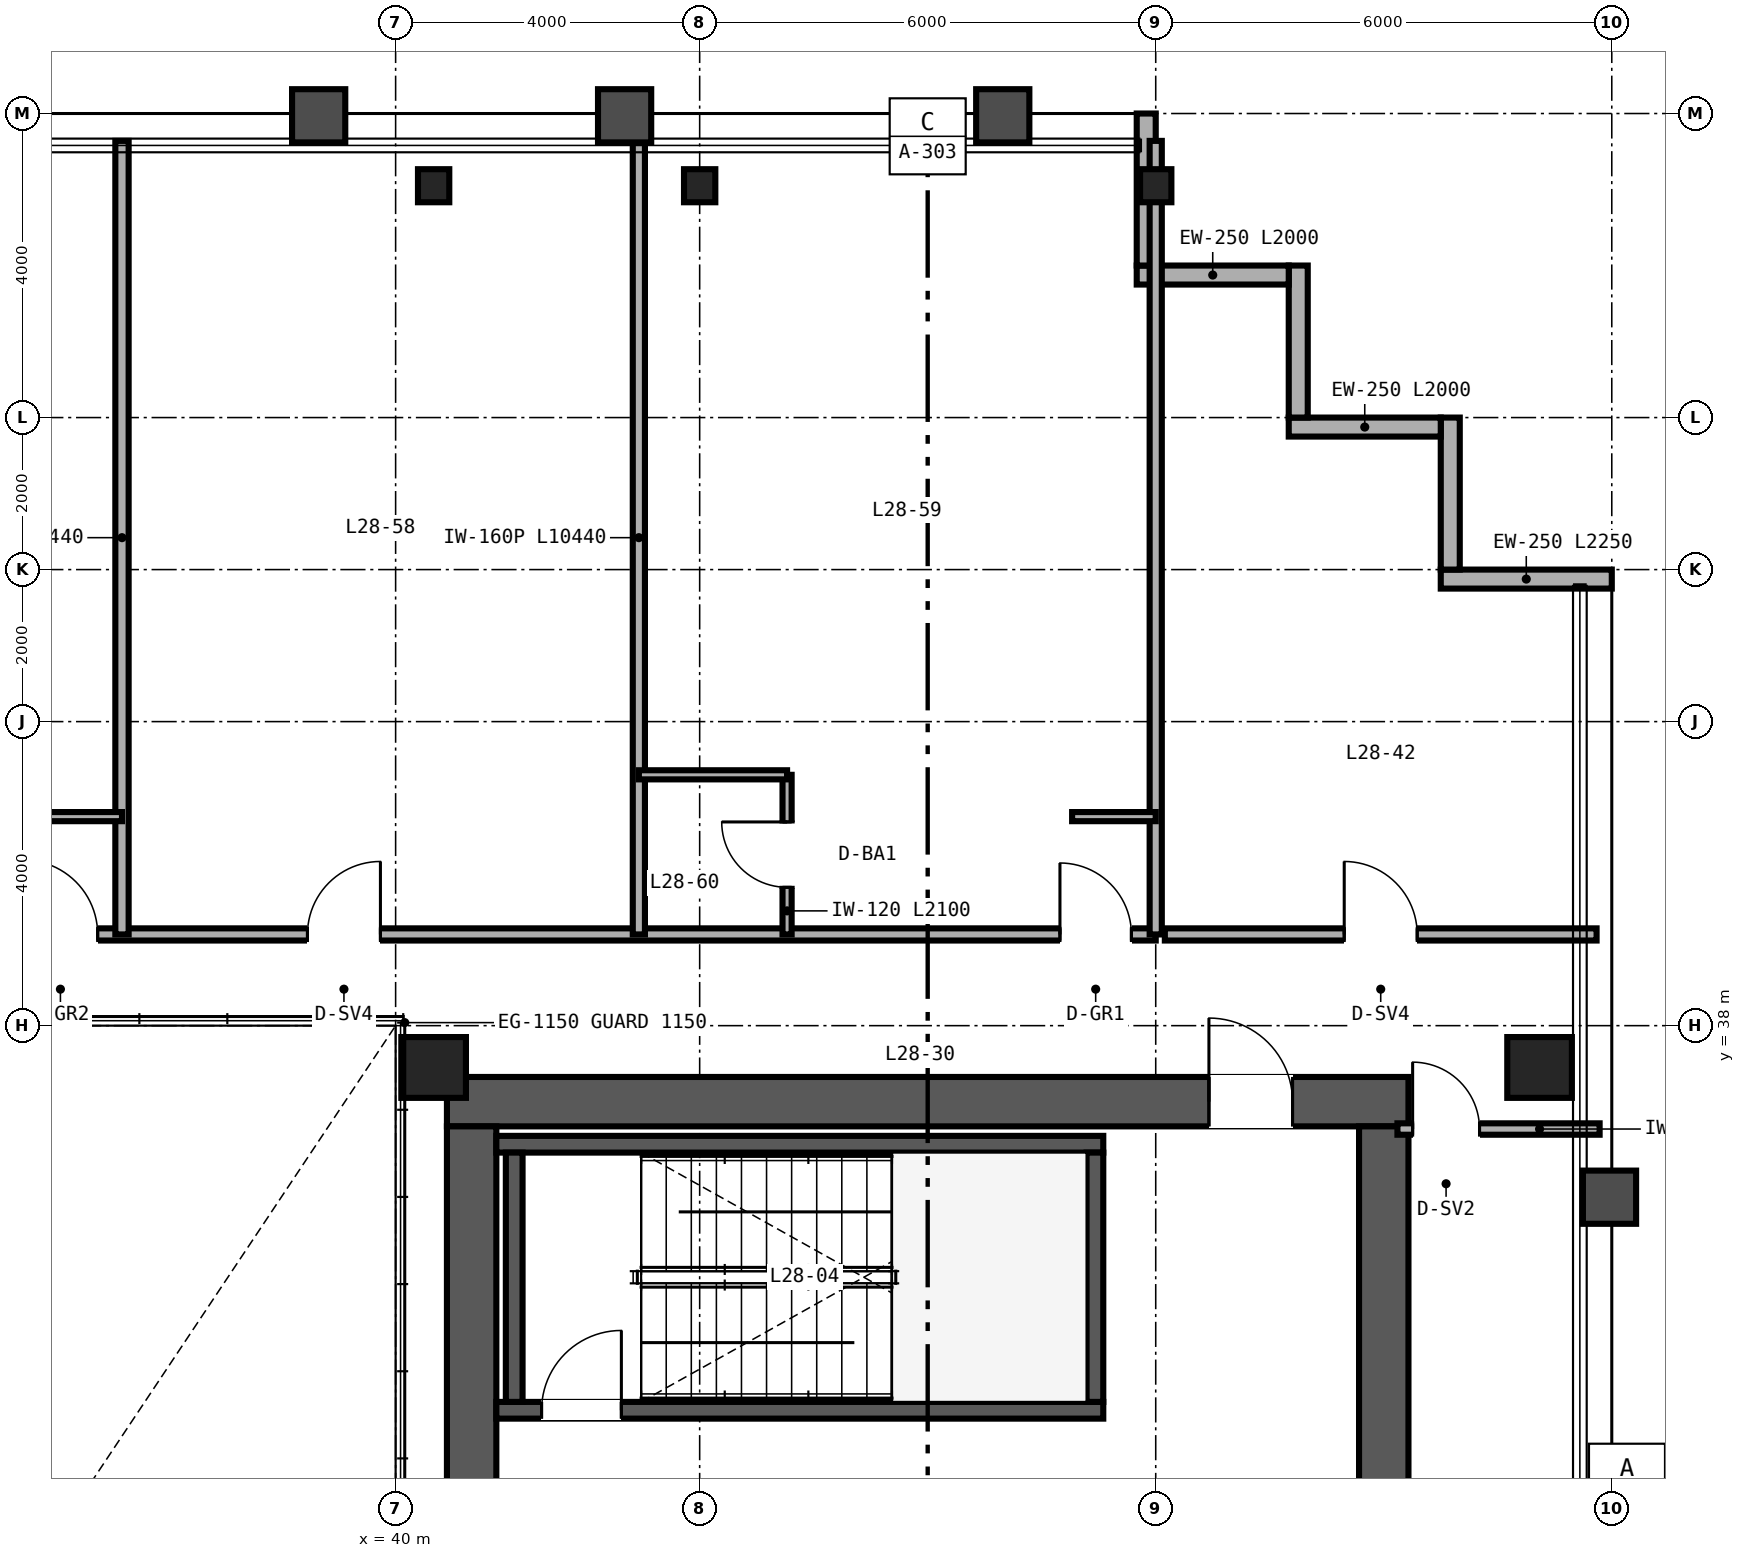
"""IFC4 building model, lengths in metres.
Left out: names, types, materials, properties, quantities, classifications, styles, units other than length and angle.
Written with IfcOpenShell. Run it as: python <this file> out.ifc"""

import sys

from ifc_helpers import new_model, si_unit, direction, frame, frame_2d, origin, origin_2d, place, context, subcontext, project, spatial, rectangle, hollow_rectangle, i_section, extrude, source, transform, mapped, element, fill, save


model = new_model("IFC4")
c1 = context("Model", 3, precision=1e-05, world=origin(), true_north=direction((0.0, 1.0)))
c2 = subcontext(c1, "Body", "Model", "MODEL_VIEW")
j1 = project(units=[si_unit("LENGTHUNIT", "METRE"), si_unit("PLANEANGLEUNIT", "RADIAN")], contexts=[c1])
p1 = place(None, origin())
s1 = spatial("IfcSite", under=j1, at=p1, CompositionType="ELEMENT")
p2 = place(p1, origin())
s2 = spatial("IfcBuilding", under=s1, at=p2, CompositionType="ELEMENT")
p3 = place(p2, frame((0.0, 0.0, 115.2)))
s3 = spatial("IfcBuildingStorey", under=s2, at=p3, CompositionType="ELEMENT", Elevation=115.2)
p4 = place(p3, frame((40.675, 37.0, 0.0), z_axis=(0.0, 0.0, 1.0), x_axis=(1.0, 0.0, 0.0)))
e1 = element("IfcWall", 1, at=p4, inside=s3, PredefinedType="SHEAR", context=c2, shape_type="SweptSolid", body=[
    extrude(rectangle(XDim=12.65, YDim=0.65, at=frame_2d((6.325, 0.0))), origin(), (0.0, 0.0, 1.0), 3.36),
])
p5 = place(p4, frame((10.025, 0.0, 0.0)))
e2 = element("IfcOpeningElement", 2, at=p5, cuts=e1, PredefinedType="OPENING", context=c2, shape_type="SweptSolid", body=[
    extrude(rectangle(XDim=1.1, YDim=2.15, at=frame_2d((0.55, 1.075))), frame((0.0, 0.335, 0.0), z_axis=(0.0, -1.0, 0.0), x_axis=(1.0, 0.0, 0.0)), (0.0, 0.0, 1.0), 0.67),
])
for number, where, z_axis, x_axis in (
    (3, (41.0, 15.325, 0.0), (0.0, 0.0, 1.0), (0.0, 1.0, 0.0)),
    (4, (53.0, 15.325, 0.0), (0.0, 0.0, 1.0), (0.0, 1.0, 0.0)),
):
    element("IfcWall", number, at=place(p3, frame(where, z_axis=z_axis, x_axis=x_axis)), inside=s3, PredefinedType="SHEAR", context=c2, shape_type="SweptSolid", body=[
        extrude(rectangle(XDim=21.35, YDim=0.65, at=frame_2d((10.675, 0.0))), origin(), (0.0, 0.0, 1.0), 3.36),
    ])
p6 = place(p3, frame((41.325, 32.94, 0.0), z_axis=(0.0, 0.0, 1.0), x_axis=(1.0, 0.0, 0.0)))
e5 = element("IfcWall", 5, at=p6, inside=s3, PredefinedType="SHEAR", context=c2, shape_type="SweptSolid", body=[
    extrude(rectangle(XDim=7.985, YDim=0.22, at=frame_2d((3.993, 0.0))), origin(), (0.0, 0.0, 1.0), 3.4),
])
p7 = place(p6, frame((0.595, 0.0, 0.0)))
e6 = element("IfcOpeningElement", 6, at=p7, cuts=e5, PredefinedType="OPENING", context=c2, shape_type="SweptSolid", body=[
    extrude(rectangle(XDim=1.05, YDim=2.15, at=frame_2d((0.525, 1.075))), frame((0.0, 0.12, 0.0), z_axis=(0.0, -1.0, 0.0), x_axis=(1.0, 0.0, 0.0)), (0.0, 0.0, 1.0), 0.24),
])
p8 = place(p3, frame((41.325, 36.44, 0.0), z_axis=(0.0, 0.0, 1.0), x_axis=(1.0, 0.0, 0.0)))
e7 = element("IfcWall", 7, at=p8, inside=s3, PredefinedType="SHEAR", context=c2, shape_type="SweptSolid", body=[
    extrude(rectangle(XDim=7.985, YDim=0.22, at=frame_2d((3.993, 0.0))), origin(), (0.0, 0.0, 1.0), 3.4),
])
for number, where, z_axis, x_axis in (
    (8, (41.56, 33.05, 0.0), (0.0, 0.0, 1.0), (0.0, 1.0, 0.0)),
    (9, (49.2, 33.05, 0.0), (0.0, 0.0, 1.0), (0.0, 1.0, 0.0)),
):
    element("IfcWall", number, at=place(p3, frame(where, z_axis=z_axis, x_axis=x_axis)), inside=s3, PredefinedType="SHEAR", context=c2, shape_type="SweptSolid", body=[
        extrude(rectangle(XDim=3.28, YDim=0.22, at=frame_2d((1.64, 0.0))), origin(), (0.0, 0.0, 1.0), 3.4),
    ])
m1 = source(origin(), c2, "Body", "SweptSolid", [
    extrude(hollow_rectangle(XDim=0.85, YDim=0.8, WallThickness=0.032, at=origin_2d()), origin(), (0.0, 0.0, 1.0), 3.36),
])
for number, where, z_axis, x_axis in (
    (10, (40.5, 37.45, 0.0), (0.0, 0.0, 1.0), (1.0, 0.0, 0.0)),
    (11, (55.05, 37.45, 0.0), (0.0, 0.0, 1.0), (1.0, 0.0, 0.0)),
):
    element("IfcColumn", number, at=place(p3, frame(where, z_axis=z_axis, x_axis=x_axis)), inside=s3, PredefinedType="COLUMN", context=c2, shape_type="MappedRepresentation", body=[
        mapped(m1, transform((0.0, 0.0, 0.0), scale=1.0)),
    ])
m2 = source(origin(), c2, "Body", "SweptSolid", [
    extrude(i_section(OverallWidth=0.412, OverallDepth=0.435, WebThickness=0.036, FlangeThickness=0.057, FilletRadius=0.025, at=origin_2d()), origin(), (0.0, 0.0, 1.0), 3.36),
])
for number, where, z_axis, x_axis in (
    (12, (40.5, 49.05, 0.0), (0.0, 0.0, 1.0), (1.0, 0.0, 0.0)),
    (13, (44.0, 49.05, 0.0), (0.0, 0.0, 1.0), (1.0, 0.0, 0.0)),
    (14, (50.0, 49.05, 0.0), (0.0, 0.0, 1.0), (1.0, 0.0, 0.0)),
):
    element("IfcColumn", number, at=place(p3, frame(where, z_axis=z_axis, x_axis=x_axis)), inside=s3, PredefinedType="COLUMN", context=c2, shape_type="MappedRepresentation", body=[
        mapped(m2, transform((0.0, 0.0, 0.0), scale=1.0)),
    ])
p9 = place(p3, frame((56.0, 43.875, 0.0), z_axis=(0.0, 0.0, 1.0), x_axis=(-1.0, 0.0, 0.0)))
e15 = element("IfcWall", 15, at=p9, inside=s3, PredefinedType="SOLIDWALL", context=c2, shape_type="SweptSolid", body=[
    extrude(rectangle(XDim=2.25, YDim=0.25, at=frame_2d((1.125, 0.0))), origin(), (0.0, 0.0, 1.0), 3.36),
])
for number, where, z_axis, x_axis in (
    (16, (53.875, 44.0, 0.0), (0.0, 0.0, 1.0), (0.0, 1.0, 0.0)),
    (17, (53.75, 45.875, 0.0), (0.0, 0.0, 1.0), (-1.0, 0.0, 0.0)),
    (18, (51.875, 46.0, 0.0), (0.0, 0.0, 1.0), (0.0, 1.0, 0.0)),
    (19, (51.75, 47.875, 0.0), (0.0, 0.0, 1.0), (-1.0, 0.0, 0.0)),
):
    element("IfcWall", number, at=place(p3, frame(where, z_axis=z_axis, x_axis=x_axis)), inside=s3, PredefinedType="SOLIDWALL", context=c2, shape_type="SweptSolid", body=[
        extrude(rectangle(XDim=2.0, YDim=0.25, at=frame_2d((1.0, 0.0))), origin(), (0.0, 0.0, 1.0), 3.36),
    ])
p10 = place(p3, frame((49.875, 48.0, 0.0), z_axis=(0.0, 0.0, 1.0), x_axis=(0.0, 1.0, 0.0)))
e20 = element("IfcWall", 20, at=p10, inside=s3, PredefinedType="SOLIDWALL", context=c2, shape_type="SweptSolid", body=[
    extrude(rectangle(XDim=2.0, YDim=0.25, at=frame_2d((1.0, 0.0))), origin(), (0.0, 0.0, 1.0), 2.667),
])
p11 = place(p3, frame((53.18, 36.64, 0.0), z_axis=(0.0, 0.0, 1.0), x_axis=(1.0, 0.0, 0.0)))
e21 = element("IfcWall", 21, at=p11, inside=s3, PredefinedType="PARTITIONING", context=c2, shape_type="SweptSolid", body=[
    extrude(rectangle(XDim=2.66, YDim=0.15, at=frame_2d((1.33, 0.0))), origin(), (0.0, 0.0, 1.0), 2.743),
])
p12 = place(p11, frame((0.2, 0.0, 0.0)))
e22 = element("IfcOpeningElement", 22, at=p12, cuts=e21, PredefinedType="OPENING", context=c2, shape_type="SweptSolid", body=[
    extrude(rectangle(XDim=0.88, YDim=2.15, at=frame_2d((0.44, 1.075))), frame((0.0, 0.085, 0.0), z_axis=(0.0, -1.0, 0.0), x_axis=(1.0, 0.0, 0.0)), (0.0, 0.0, 1.0), 0.17),
])
p13 = place(p3, frame((50.12, 39.2, 0.0), z_axis=(0.0, 0.0, 1.0), x_axis=(1.0, 0.0, 0.0)))
e23 = element("IfcWall", 23, at=p13, inside=s3, PredefinedType="PARTITIONING", context=c2, shape_type="SweptSolid", body=[
    extrude(rectangle(XDim=5.68, YDim=0.16, at=frame_2d((2.84, 0.0))), origin(), (0.0, 0.0, 1.0), 3.36),
])
p14 = place(p13, frame((2.36, 0.0, 0.0)))
e24 = element("IfcOpeningElement", 24, at=p14, cuts=e23, PredefinedType="OPENING", context=c2, shape_type="SweptSolid", body=[
    extrude(rectangle(XDim=0.96, YDim=2.15, at=frame_2d((0.48, 1.075))), frame((0.0, 0.09, 0.0), z_axis=(0.0, -1.0, 0.0), x_axis=(1.0, 0.0, 0.0)), (0.0, 0.0, 1.0), 0.18),
])
p15 = place(p3, frame((14.0, 39.2, 0.0), z_axis=(0.0, 0.0, 1.0), x_axis=(1.0, 0.0, 0.0)))
e25 = element("IfcWall", 25, at=p15, inside=s3, PredefinedType="PARTITIONING", context=c2, shape_type="SweptSolid", body=[
    extrude(rectangle(XDim=36.0, YDim=0.16, at=frame_2d((18.0, 0.0))), origin(), (0.0, 0.0, 1.0), 2.581),
])
p16 = place(p15, frame((6.1, 0.0, 0.0)))
e26 = element("IfcOpeningElement", 26, at=p16, cuts=e25, PredefinedType="OPENING", context=c2, shape_type="SweptSolid", body=[
    extrude(rectangle(XDim=0.98, YDim=2.2, at=frame_2d((0.49, 1.1))), frame((0.0, 0.09, 0.0), z_axis=(0.0, -1.0, 0.0), x_axis=(1.0, 0.0, 0.0)), (0.0, 0.0, 1.0), 0.18),
])
p17 = place(p15, frame((10.62, 0.0, 0.0)))
e27 = element("IfcOpeningElement", 27, at=p17, cuts=e25, PredefinedType="OPENING", context=c2, shape_type="SweptSolid", body=[
    extrude(rectangle(XDim=0.96, YDim=2.15, at=frame_2d((0.48, 1.075))), frame((0.0, 0.09, 0.0), z_axis=(0.0, -1.0, 0.0), x_axis=(1.0, 0.0, 0.0)), (0.0, 0.0, 1.0), 0.18),
])
p18 = place(p15, frame((21.1, 0.0, 0.0)))
e28 = element("IfcOpeningElement", 28, at=p18, cuts=e25, PredefinedType="OPENING", context=c2, shape_type="SweptSolid", body=[
    extrude(rectangle(XDim=0.98, YDim=2.2, at=frame_2d((0.49, 1.1))), frame((0.0, 0.09, 0.0), z_axis=(0.0, -1.0, 0.0), x_axis=(1.0, 0.0, 0.0)), (0.0, 0.0, 1.0), 0.18),
])
p19 = place(p15, frame((24.84, 0.0, 0.0)))
e29 = element("IfcOpeningElement", 29, at=p19, cuts=e25, PredefinedType="OPENING", context=c2, shape_type="SweptSolid", body=[
    extrude(rectangle(XDim=0.96, YDim=2.15, at=frame_2d((0.48, 1.075))), frame((0.0, 0.09, 0.0), z_axis=(0.0, -1.0, 0.0), x_axis=(1.0, 0.0, 0.0)), (0.0, 0.0, 1.0), 0.18),
])
p20 = place(p15, frame((34.74, 0.0, 0.0)))
e30 = element("IfcOpeningElement", 30, at=p20, cuts=e25, PredefinedType="OPENING", context=c2, shape_type="SweptSolid", body=[
    extrude(rectangle(XDim=0.94, YDim=2.15, at=frame_2d((0.47, 1.075))), frame((0.0, 0.09, 0.0), z_axis=(0.0, -1.0, 0.0), x_axis=(1.0, 0.0, 0.0)), (0.0, 0.0, 1.0), 0.18),
])
p21 = place(p3, frame((50.0, 39.2, 0.0), z_axis=(0.0, 0.0, 1.0), x_axis=(0.0, 1.0, 0.0)))
e31 = element("IfcWall", 31, at=p21, inside=s3, PredefinedType="PARTITIONING", context=c2, shape_type="SweptSolid", body=[
    extrude(rectangle(XDim=10.44, YDim=0.16, at=frame_2d((5.22, 0.0))), origin(), (0.0, 0.0, 1.0), 2.667),
])
p22 = place(p3, frame((36.4, 39.2, 0.0), z_axis=(0.0, 0.0, 1.0), x_axis=(0.0, 1.0, 0.0)))
e32 = element("IfcWall", 32, at=p22, inside=s3, PredefinedType="PARTITIONING", context=c2, shape_type="SweptSolid", body=[
    extrude(rectangle(XDim=10.44, YDim=0.175, at=frame_2d((5.22, 0.0))), origin(), (0.0, 0.0, 1.0), 2.433),
])
p23 = place(p3, frame((35.3, 40.75, 0.0), z_axis=(0.0, 0.0, 1.0), x_axis=(1.0, 0.0, 0.0)))
e33 = element("IfcWall", 33, at=p23, inside=s3, PredefinedType="PARTITIONING", context=c2, shape_type="SweptSolid", body=[
    extrude(rectangle(XDim=1.1, YDim=0.12, at=frame_2d((0.55, 0.0))), origin(), (0.0, 0.0, 1.0), 3.36),
])
p24 = place(p3, frame((43.2, 39.2, 0.0), z_axis=(0.0, 0.0, 1.0), x_axis=(0.0, 1.0, 0.0)))
e34 = element("IfcWall", 34, at=p24, inside=s3, PredefinedType="PARTITIONING", context=c2, shape_type="SweptSolid", body=[
    extrude(rectangle(XDim=10.44, YDim=0.16, at=frame_2d((5.22, 0.0))), origin(), (0.0, 0.0, 1.0), 2.823),
])
p25 = place(p3, frame((45.15, 39.2, 0.0), z_axis=(0.0, 0.0, 1.0), x_axis=(0.0, 1.0, 0.0)))
e35 = element("IfcWall", 35, at=p25, inside=s3, PredefinedType="PARTITIONING", context=c2, shape_type="SweptSolid", body=[
    extrude(rectangle(XDim=2.1, YDim=0.12, at=frame_2d((1.05, 0.0))), origin(), (0.0, 0.0, 1.0), 3.36),
])
p26 = place(p25, frame((0.62, 0.0, 0.0)))
e36 = element("IfcOpeningElement", 36, at=p26, cuts=e35, PredefinedType="OPENING", context=c2, shape_type="SweptSolid", body=[
    extrude(rectangle(XDim=0.86, YDim=2.1, at=frame_2d((0.43, 1.05))), frame((0.0, 0.07, 0.0), z_axis=(0.0, -1.0, 0.0), x_axis=(1.0, 0.0, 0.0)), (0.0, 0.0, 1.0), 0.14),
])
p27 = place(p3, frame((43.2, 41.3, 0.0), z_axis=(0.0, 0.0, 1.0), x_axis=(1.0, 0.0, 0.0)))
e37 = element("IfcWall", 37, at=p27, inside=s3, PredefinedType="PARTITIONING", context=c2, shape_type="SweptSolid", body=[
    extrude(rectangle(XDim=1.95, YDim=0.12, at=frame_2d((0.975, 0.0))), origin(), (0.0, 0.0, 1.0), 3.36),
])
p28 = place(p3, frame((48.9, 40.75, 0.0), z_axis=(0.0, 0.0, 1.0), x_axis=(1.0, 0.0, 0.0)))
e38 = element("IfcWall", 38, at=p28, inside=s3, PredefinedType="PARTITIONING", context=c2, shape_type="SweptSolid", body=[
    extrude(rectangle(XDim=1.1, YDim=0.12, at=frame_2d((0.55, 0.0))), origin(), (0.0, 0.0, 1.0), 3.36),
])
m3 = source(origin(), c2, "Body", "SweptSolid", [
    extrude(rectangle(XDim=1.05, YDim=2.15, at=frame_2d((0.525, 1.075))), frame((0.0, 0.025, 0.0), z_axis=(0.0, -1.0, 0.0), x_axis=(1.0, 0.0, 0.0)), (0.0, 0.0, 1.0), 0.05),
])
p29 = place(p7, origin())
e39 = element("IfcDoor", 39, at=p29, inside=s3, OperationType="SINGLE_SWING_RIGHT", PredefinedType="DOOR", context=c2, shape_type="MappedRepresentation", body=[
    mapped(m3, transform((0.0, 0.0, 0.0), scale=1.0)),
])
fill(e6, e39)
m4 = source(origin(), c2, "Body", "SweptSolid", [
    extrude(rectangle(XDim=1.1, YDim=2.15, at=frame_2d((0.55, 1.075))), frame((0.0, 0.025, 0.0), z_axis=(0.0, -1.0, 0.0), x_axis=(1.0, 0.0, 0.0)), (0.0, 0.0, 1.0), 0.05),
])
p30 = place(p5, origin())
e40 = element("IfcDoor", 40, at=p30, inside=s3, OperationType="SINGLE_SWING_LEFT", PredefinedType="DOOR", context=c2, shape_type="MappedRepresentation", body=[
    mapped(m4, transform((0.0, 0.0, 0.0), scale=1.0)),
])
fill(e2, e40)
m5 = source(origin(), c2, "Body", "SweptSolid", [
    extrude(rectangle(XDim=0.88, YDim=2.15, at=frame_2d((0.44, 1.075))), frame((0.0, 0.025, 0.0), z_axis=(0.0, -1.0, 0.0), x_axis=(1.0, 0.0, 0.0)), (0.0, 0.0, 1.0), 0.05),
])
p31 = place(p12, origin())
e41 = element("IfcDoor", 41, at=p31, inside=s3, OperationType="SINGLE_SWING_LEFT", PredefinedType="DOOR", context=c2, shape_type="MappedRepresentation", body=[
    mapped(m5, transform((0.0, 0.0, 0.0), scale=1.0)),
])
fill(e22, e41)
m6 = source(origin(), c2, "Body", "SweptSolid", [
    extrude(rectangle(XDim=0.96, YDim=2.15, at=frame_2d((0.48, 1.075))), frame((0.0, 0.025, 0.0), z_axis=(0.0, -1.0, 0.0), x_axis=(1.0, 0.0, 0.0)), (0.0, 0.0, 1.0), 0.05),
])
p32 = place(p14, origin())
e42 = element("IfcDoor", 42, at=p32, inside=s3, OperationType="SINGLE_SWING_LEFT", PredefinedType="DOOR", context=c2, shape_type="MappedRepresentation", body=[
    mapped(m6, transform((0.0, 0.0, 0.0), scale=1.0)),
])
fill(e24, e42)
m7 = source(origin(), c2, "Body", "SweptSolid", [
    extrude(rectangle(XDim=0.86, YDim=2.1, at=frame_2d((0.43, 1.05))), frame((0.0, 0.025, 0.0), z_axis=(0.0, -1.0, 0.0), x_axis=(1.0, 0.0, 0.0)), (0.0, 0.0, 1.0), 0.05),
])
p33 = place(p26, origin())
e43 = element("IfcDoor", 43, at=p33, inside=s3, OperationType="SINGLE_SWING_RIGHT", PredefinedType="DOOR", context=c2, shape_type="MappedRepresentation", body=[
    mapped(m7, transform((0.0, 0.0, 0.0), scale=1.0)),
])
fill(e36, e43)
m8 = source(origin(), c2, "Body", "SweptSolid", [
    extrude(rectangle(XDim=0.98, YDim=2.2, at=frame_2d((0.49, 1.1))), frame((0.0, 0.025, 0.0), z_axis=(0.0, -1.0, 0.0), x_axis=(1.0, 0.0, 0.0)), (0.0, 0.0, 1.0), 0.05),
])
p34 = place(p18, origin())
e44 = element("IfcDoor", 44, at=p34, inside=s3, OperationType="SINGLE_SWING_LEFT", PredefinedType="DOOR", context=c2, shape_type="MappedRepresentation", body=[
    mapped(m8, transform((0.0, 0.0, 0.0), scale=1.0)),
])
fill(e28, e44)
p35 = place(p19, origin())
e45 = element("IfcDoor", 45, at=p35, inside=s3, OperationType="SINGLE_SWING_RIGHT", PredefinedType="DOOR", context=c2, shape_type="MappedRepresentation", body=[
    mapped(m6, transform((0.0, 0.0, 0.0), scale=1.0)),
])
fill(e29, e45)
m9 = source(origin(), c2, "Body", "SweptSolid", [
    extrude(rectangle(XDim=0.94, YDim=2.15, at=frame_2d((0.47, 1.075))), frame((0.0, 0.025, 0.0), z_axis=(0.0, -1.0, 0.0), x_axis=(1.0, 0.0, 0.0)), (0.0, 0.0, 1.0), 0.05),
])
p36 = place(p20, origin())
e46 = element("IfcDoor", 46, at=p36, inside=s3, OperationType="SINGLE_SWING_LEFT", PredefinedType="DOOR", context=c2, shape_type="MappedRepresentation", body=[
    mapped(m9, transform((0.0, 0.0, 0.0), scale=1.0)),
])
fill(e30, e46)
save(model, sys.argv[1])
